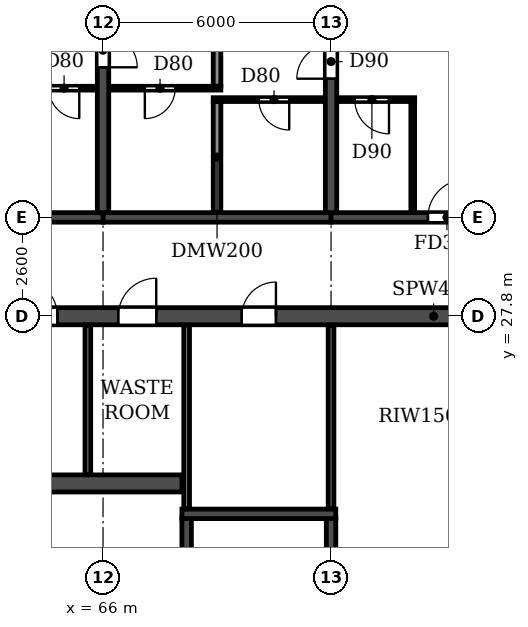
"""IFC4 building model, lengths in metres.
Left out: names, types, materials, properties, quantities, classifications, styles, units other than length and angle.
Written with IfcOpenShell. Run it as: python <this file> out.ifc"""

import sys

from ifc_helpers import new_model, si_unit, direction, frame, frame_2d, origin, place, context, subcontext, project, spatial, rectangle, extrude, element, fill, save


model = new_model("IFC4")
c1 = context("Model", 3, precision=1e-05, world=origin(), true_north=direction((0.0, 1.0)))
c2 = subcontext(c1, "Body", "Model", "MODEL_VIEW")
j1 = project(units=[si_unit("LENGTHUNIT", "METRE"), si_unit("PLANEANGLEUNIT", "RADIAN")], contexts=[c1])
p1 = place(None, origin())
s1 = spatial("IfcSite", under=j1, at=p1, CompositionType="ELEMENT")
p2 = place(p1, origin())
s2 = spatial("IfcBuilding", under=s1, at=p2, CompositionType="ELEMENT")
p3 = place(p2, frame((0.0, 0.0, 152.1)))
s3 = spatial("IfcBuildingStorey", under=s2, at=p3, CompositionType="ELEMENT", Elevation=152.1)
p4 = place(p3, frame((66.0, 30.525, 0.0), z_axis=(0.0, 0.0, 1.0), x_axis=(0.0, 1.0, 0.0)))
e1 = element("IfcWall", 1, at=p4, inside=s3, PredefinedType="SHEAR", context=c2, shape_type="SweptSolid", body=[
    extrude(rectangle(XDim=11.675, YDim=0.3, at=frame_2d((5.837, 0.0))), origin(), (0.0, 0.0, 1.0), 3.07),
])
p5 = place(p4, frame((3.825, 0.0, 0.0)))
e2 = element("IfcOpeningElement", 2, at=p5, cuts=e1, PredefinedType="OPENING", context=c2, shape_type="SweptSolid", body=[
    extrude(rectangle(XDim=0.9, YDim=2.1, at=frame_2d((0.45, 1.05))), frame((0.0, 0.16, 0.0), z_axis=(0.0, -1.0, 0.0), x_axis=(1.0, 0.0, 0.0)), (0.0, 0.0, 1.0), 0.32),
])
p6 = place(p3, frame((72.0, 30.525, 0.0), z_axis=(0.0, 0.0, 1.0), x_axis=(0.0, 1.0, 0.0)))
e3 = element("IfcWall", 3, at=p6, inside=s3, PredefinedType="SHEAR", context=c2, shape_type="SweptSolid", body=[
    extrude(rectangle(XDim=11.675, YDim=0.3, at=frame_2d((5.837, 0.0))), origin(), (0.0, 0.0, 1.0), 3.07),
])
p7 = place(p6, frame((3.525, 0.0, 0.0)))
e4 = element("IfcOpeningElement", 4, at=p7, cuts=e3, PredefinedType="OPENING", context=c2, shape_type="SweptSolid", body=[
    extrude(rectangle(XDim=0.9, YDim=2.1, at=frame_2d((0.45, 1.05))), frame((0.0, 0.16, 0.0), z_axis=(0.0, -1.0, 0.0), x_axis=(1.0, 0.0, 0.0)), (0.0, 0.0, 1.0), 0.32),
])
p8 = place(p3, frame((60.0, 30.4, 0.0), z_axis=(0.0, 0.0, 1.0), x_axis=(1.0, 0.0, 0.0)))
e5 = element("IfcWall", 5, at=p8, inside=s3, PredefinedType="SHEAR", context=c2, shape_type="SweptSolid", body=[
    extrude(rectangle(XDim=6.0, YDim=0.25, at=frame_2d((3.0, 0.0))), origin(), (0.0, 0.0, 1.0), 2.47),
])
p9 = place(p8, frame((2.55, 0.0, 0.0)))
e6 = element("IfcOpeningElement", 6, at=p9, cuts=e5, PredefinedType="OPENING", context=c2, shape_type="SweptSolid", body=[
    extrude(rectangle(XDim=1.0, YDim=2.1, at=frame_2d((0.5, 1.05))), frame((0.0, 0.135, 0.0), z_axis=(0.0, -1.0, 0.0), x_axis=(1.0, 0.0, 0.0)), (0.0, 0.0, 1.0), 0.27),
])
p10 = place(p3, frame((66.0, 30.4, 0.0), z_axis=(0.0, 0.0, 1.0), x_axis=(1.0, 0.0, 0.0)))
e7 = element("IfcWall", 7, at=p10, inside=s3, PredefinedType="SHEAR", context=c2, shape_type="SweptSolid", body=[
    extrude(rectangle(XDim=6.0, YDim=0.25, at=frame_2d((3.0, 0.0))), origin(), (0.0, 0.0, 1.0), 2.47),
])
p11 = place(p3, frame((72.0, 30.4, 0.0), z_axis=(0.0, 0.0, 1.0), x_axis=(1.0, 0.0, 0.0)))
e8 = element("IfcWall", 8, at=p11, inside=s3, PredefinedType="SHEAR", context=c2, shape_type="SweptSolid", body=[
    extrude(rectangle(XDim=6.0, YDim=0.25, at=frame_2d((3.0, 0.0))), origin(), (0.0, 0.0, 1.0), 2.47),
])
p12 = place(p11, frame((2.55, 0.0, 0.0)))
e9 = element("IfcOpeningElement", 9, at=p12, cuts=e8, PredefinedType="OPENING", context=c2, shape_type="SweptSolid", body=[
    extrude(rectangle(XDim=1.0, YDim=2.1, at=frame_2d((0.5, 1.05))), frame((0.0, 0.135, 0.0), z_axis=(0.0, -1.0, 0.0), x_axis=(1.0, 0.0, 0.0)), (0.0, 0.0, 1.0), 0.27),
])
p13 = place(p3, frame((12.2, 27.8, 0.0), z_axis=(0.0, 0.0, 1.0), x_axis=(1.0, 0.0, 0.0)))
e10 = element("IfcWall", 10, at=p13, inside=s3, PredefinedType="SOLIDWALL", context=c2, shape_type="SweptSolid", body=[
    extrude(rectangle(XDim=77.6, YDim=0.45, at=frame_2d((38.8, 0.0))), origin(), (0.0, 0.0, 1.0), 3.07),
])
p14 = place(p13, frame((2.3, 0.0, 0.0)))
e11 = element("IfcOpeningElement", 11, at=p14, cuts=e10, PredefinedType="OPENING", context=c2, shape_type="SweptSolid", body=[
    extrude(rectangle(XDim=1.0, YDim=2.1, at=frame_2d((0.5, 1.05))), frame((0.0, 0.235, 0.0), z_axis=(0.0, -1.0, 0.0), x_axis=(1.0, 0.0, 0.0)), (0.0, 0.0, 1.0), 0.47),
])
p15 = place(p13, frame((6.7, 0.0, 0.0)))
e12 = element("IfcOpeningElement", 12, at=p15, cuts=e10, PredefinedType="OPENING", context=c2, shape_type="SweptSolid", body=[
    extrude(rectangle(XDim=1.0, YDim=2.1, at=frame_2d((0.5, 1.05))), frame((0.0, 0.235, 0.0), z_axis=(0.0, -1.0, 0.0), x_axis=(1.0, 0.0, 0.0)), (0.0, 0.0, 1.0), 0.47),
])
p16 = place(p13, frame((10.05, 0.0, 0.0)))
e13 = element("IfcOpeningElement", 13, at=p16, cuts=e10, PredefinedType="OPENING", context=c2, shape_type="SweptSolid", body=[
    extrude(rectangle(XDim=0.9, YDim=2.1, at=frame_2d((0.45, 1.05))), frame((0.0, 0.235, 0.0), z_axis=(0.0, -1.0, 0.0), x_axis=(1.0, 0.0, 0.0)), (0.0, 0.0, 1.0), 0.47),
])
p17 = place(p13, frame((19.25, 0.0, 0.0)))
e14 = element("IfcOpeningElement", 14, at=p17, cuts=e10, PredefinedType="OPENING", context=c2, shape_type="SweptSolid", body=[
    extrude(rectangle(XDim=0.9, YDim=2.1, at=frame_2d((0.45, 1.05))), frame((0.0, 0.235, 0.0), z_axis=(0.0, -1.0, 0.0), x_axis=(1.0, 0.0, 0.0)), (0.0, 0.0, 1.0), 0.47),
])
p18 = place(p13, frame((22.4, 0.0, 0.0)))
e15 = element("IfcOpeningElement", 15, at=p18, cuts=e10, PredefinedType="OPENING", context=c2, shape_type="SweptSolid", body=[
    extrude(rectangle(XDim=1.0, YDim=2.1, at=frame_2d((0.5, 1.05))), frame((0.0, 0.235, 0.0), z_axis=(0.0, -1.0, 0.0), x_axis=(1.0, 0.0, 0.0)), (0.0, 0.0, 1.0), 0.47),
])
p19 = place(p13, frame((27.6, 0.0, 0.0)))
e16 = element("IfcOpeningElement", 16, at=p19, cuts=e10, PredefinedType="OPENING", context=c2, shape_type="SweptSolid", body=[
    extrude(rectangle(XDim=1.0, YDim=2.1, at=frame_2d((0.5, 1.05))), frame((0.0, 0.235, 0.0), z_axis=(0.0, -1.0, 0.0), x_axis=(1.0, 0.0, 0.0)), (0.0, 0.0, 1.0), 0.47),
])
p20 = place(p13, frame((35.4, 0.0, 0.0)))
e17 = element("IfcOpeningElement", 17, at=p20, cuts=e10, PredefinedType="OPENING", context=c2, shape_type="SweptSolid", body=[
    extrude(rectangle(XDim=1.0, YDim=2.1, at=frame_2d((0.5, 1.05))), frame((0.0, 0.235, 0.0), z_axis=(0.0, -1.0, 0.0), x_axis=(1.0, 0.0, 0.0)), (0.0, 0.0, 1.0), 0.47),
])
p21 = place(p13, frame((38.3, 0.0, 0.0)))
e18 = element("IfcOpeningElement", 18, at=p21, cuts=e10, PredefinedType="OPENING", context=c2, shape_type="SweptSolid", body=[
    extrude(rectangle(XDim=1.0, YDim=2.1, at=frame_2d((0.5, 1.05))), frame((0.0, 0.235, 0.0), z_axis=(0.0, -1.0, 0.0), x_axis=(1.0, 0.0, 0.0)), (0.0, 0.0, 1.0), 0.47),
])
p22 = place(p13, frame((42.25, 0.0, 0.0)))
e19 = element("IfcOpeningElement", 19, at=p22, cuts=e10, PredefinedType="OPENING", context=c2, shape_type="SweptSolid", body=[
    extrude(rectangle(XDim=1.5, YDim=2.1, at=frame_2d((0.75, 1.05))), frame((0.0, 0.235, 0.0), z_axis=(0.0, -1.0, 0.0), x_axis=(1.0, 0.0, 0.0)), (0.0, 0.0, 1.0), 0.47),
])
p23 = place(p13, frame((47.7, 0.0, 0.0)))
e20 = element("IfcOpeningElement", 20, at=p23, cuts=e10, PredefinedType="OPENING", context=c2, shape_type="SweptSolid", body=[
    extrude(rectangle(XDim=1.0, YDim=2.1, at=frame_2d((0.5, 1.05))), frame((0.0, 0.235, 0.0), z_axis=(0.0, -1.0, 0.0), x_axis=(1.0, 0.0, 0.0)), (0.0, 0.0, 1.0), 0.47),
])
p24 = place(p13, frame((51.6, 0.0, 0.0)))
e21 = element("IfcOpeningElement", 21, at=p24, cuts=e10, PredefinedType="OPENING", context=c2, shape_type="SweptSolid", body=[
    extrude(rectangle(XDim=1.0, YDim=2.1, at=frame_2d((0.5, 1.05))), frame((0.0, 0.235, 0.0), z_axis=(0.0, -1.0, 0.0), x_axis=(1.0, 0.0, 0.0)), (0.0, 0.0, 1.0), 0.47),
])
p25 = place(p13, frame((54.2, 0.0, 0.0)))
e22 = element("IfcOpeningElement", 22, at=p25, cuts=e10, PredefinedType="OPENING", context=c2, shape_type="SweptSolid", body=[
    extrude(rectangle(XDim=1.0, YDim=2.1, at=frame_2d((0.5, 1.05))), frame((0.0, 0.235, 0.0), z_axis=(0.0, -1.0, 0.0), x_axis=(1.0, 0.0, 0.0)), (0.0, 0.0, 1.0), 0.47),
])
p26 = place(p13, frame((57.45, 0.0, 0.0)))
e23 = element("IfcOpeningElement", 23, at=p26, cuts=e10, PredefinedType="OPENING", context=c2, shape_type="SweptSolid", body=[
    extrude(rectangle(XDim=0.9, YDim=2.1, at=frame_2d((0.45, 1.05))), frame((0.0, 0.235, 0.0), z_axis=(0.0, -1.0, 0.0), x_axis=(1.0, 0.0, 0.0)), (0.0, 0.0, 1.0), 0.47),
])
p27 = place(p13, frame((66.65, 0.0, 0.0)))
e24 = element("IfcOpeningElement", 24, at=p27, cuts=e10, PredefinedType="OPENING", context=c2, shape_type="SweptSolid", body=[
    extrude(rectangle(XDim=0.9, YDim=2.1, at=frame_2d((0.45, 1.05))), frame((0.0, 0.235, 0.0), z_axis=(0.0, -1.0, 0.0), x_axis=(1.0, 0.0, 0.0)), (0.0, 0.0, 1.0), 0.47),
])
p28 = place(p13, frame((69.9, 0.0, 0.0)))
e25 = element("IfcOpeningElement", 25, at=p28, cuts=e10, PredefinedType="OPENING", context=c2, shape_type="SweptSolid", body=[
    extrude(rectangle(XDim=1.0, YDim=2.1, at=frame_2d((0.5, 1.05))), frame((0.0, 0.235, 0.0), z_axis=(0.0, -1.0, 0.0), x_axis=(1.0, 0.0, 0.0)), (0.0, 0.0, 1.0), 0.47),
])
p29 = place(p13, frame((74.3, 0.0, 0.0)))
e26 = element("IfcOpeningElement", 26, at=p29, cuts=e10, PredefinedType="OPENING", context=c2, shape_type="SweptSolid", body=[
    extrude(rectangle(XDim=1.0, YDim=2.1, at=frame_2d((0.5, 1.05))), frame((0.0, 0.235, 0.0), z_axis=(0.0, -1.0, 0.0), x_axis=(1.0, 0.0, 0.0)), (0.0, 0.0, 1.0), 0.47),
])
p30 = place(p3, frame((33.925, 23.4, 0.0), z_axis=(0.0, 0.0, 1.0), x_axis=(1.0, 0.0, 0.0)))
e27 = element("IfcWall", 27, at=p30, inside=s3, PredefinedType="SOLIDWALL", context=c2, shape_type="SweptSolid", body=[
    extrude(rectangle(XDim=34.15, YDim=0.45, at=frame_2d((17.075, 0.0))), origin(), (0.0, 0.0, 1.0), 3.07),
])
p31 = place(p30, frame((16.175, 0.0, 0.0)))
e28 = element("IfcOpeningElement", 28, at=p31, cuts=e27, PredefinedType="OPENING", context=c2, shape_type="SweptSolid", body=[
    extrude(rectangle(XDim=1.8, YDim=2.1, at=frame_2d((0.9, 1.05))), frame((0.0, 0.235, 0.0), z_axis=(0.0, -1.0, 0.0), x_axis=(1.0, 0.0, 0.0)), (0.0, 0.0, 1.0), 0.47),
])
p32 = place(p30, frame((0.625, 0.0, 0.0)))
e29 = element("IfcOpeningElement", 29, at=p32, cuts=e27, PredefinedType="OPENING", context=c2, shape_type="SweptSolid", body=[
    extrude(rectangle(XDim=1.1, YDim=2.1, at=frame_2d((0.55, 1.05))), frame((0.0, 0.235, 0.0), z_axis=(0.0, -1.0, 0.0), x_axis=(1.0, 0.0, 0.0)), (0.0, 0.0, 1.0), 0.47),
])
p33 = place(p30, frame((3.225, 0.0, 0.0)))
e30 = element("IfcOpeningElement", 30, at=p33, cuts=e27, PredefinedType="OPENING", context=c2, shape_type="SweptSolid", body=[
    extrude(rectangle(XDim=1.1, YDim=2.1, at=frame_2d((0.55, 1.05))), frame((0.0, 0.235, 0.0), z_axis=(0.0, -1.0, 0.0), x_axis=(1.0, 0.0, 0.0)), (0.0, 0.0, 1.0), 0.47),
])
p34 = place(p30, frame((5.825, 0.0, 0.0)))
e31 = element("IfcOpeningElement", 31, at=p34, cuts=e27, PredefinedType="OPENING", context=c2, shape_type="SweptSolid", body=[
    extrude(rectangle(XDim=1.1, YDim=2.1, at=frame_2d((0.55, 1.05))), frame((0.0, 0.235, 0.0), z_axis=(0.0, -1.0, 0.0), x_axis=(1.0, 0.0, 0.0)), (0.0, 0.0, 1.0), 0.47),
])
p35 = place(p30, frame((8.425, 0.0, 0.0)))
e32 = element("IfcOpeningElement", 32, at=p35, cuts=e27, PredefinedType="OPENING", context=c2, shape_type="SweptSolid", body=[
    extrude(rectangle(XDim=1.1, YDim=2.1, at=frame_2d((0.55, 1.05))), frame((0.0, 0.235, 0.0), z_axis=(0.0, -1.0, 0.0), x_axis=(1.0, 0.0, 0.0)), (0.0, 0.0, 1.0), 0.47),
])
p36 = place(p30, frame((11.025, 0.0, 0.0)))
e33 = element("IfcOpeningElement", 33, at=p36, cuts=e27, PredefinedType="OPENING", context=c2, shape_type="SweptSolid", body=[
    extrude(rectangle(XDim=1.1, YDim=2.1, at=frame_2d((0.55, 1.05))), frame((0.0, 0.235, 0.0), z_axis=(0.0, -1.0, 0.0), x_axis=(1.0, 0.0, 0.0)), (0.0, 0.0, 1.0), 0.47),
])
p37 = place(p30, frame((13.625, 0.0, 0.0)))
e34 = element("IfcOpeningElement", 34, at=p37, cuts=e27, PredefinedType="OPENING", context=c2, shape_type="SweptSolid", body=[
    extrude(rectangle(XDim=1.1, YDim=2.1, at=frame_2d((0.55, 1.05))), frame((0.0, 0.235, 0.0), z_axis=(0.0, -1.0, 0.0), x_axis=(1.0, 0.0, 0.0)), (0.0, 0.0, 1.0), 0.47),
])
p38 = place(p30, frame((27.225, 0.0, 0.0)))
e35 = element("IfcOpeningElement", 35, at=p38, cuts=e27, PredefinedType="OPENING", context=c2, shape_type="SweptSolid", body=[
    extrude(rectangle(XDim=1.1, YDim=2.1, at=frame_2d((0.55, 1.05))), frame((0.0, 0.235, 0.0), z_axis=(0.0, -1.0, 0.0), x_axis=(1.0, 0.0, 0.0)), (0.0, 0.0, 1.0), 0.47),
])
p39 = place(p3, frame((68.2, 14.825, 0.0), z_axis=(0.0, 0.0, 1.0), x_axis=(0.0, 1.0, 0.0)))
e36 = element("IfcWall", 36, at=p39, inside=s3, PredefinedType="SOLIDWALL", context=c2, shape_type="SweptSolid", body=[
    extrude(rectangle(XDim=7.65, YDim=0.25, at=frame_2d((3.825, 0.0))), origin(), (0.0, 0.0, 1.0), 3.07),
])
p40 = place(p39, frame((0.475, 0.0, 0.0)))
e37 = element("IfcOpeningElement", 37, at=p40, cuts=e36, PredefinedType="OPENING", context=c2, shape_type="SweptSolid", body=[
    extrude(rectangle(XDim=1.0, YDim=2.1, at=frame_2d((0.5, 1.05))), frame((0.0, 0.135, 0.0), z_axis=(0.0, -1.0, 0.0), x_axis=(1.0, 0.0, 0.0)), (0.0, 0.0, 1.0), 0.27),
])
p41 = place(p3, frame((72.0, 14.825, 0.0), z_axis=(0.0, 0.0, 1.0), x_axis=(0.0, 1.0, 0.0)))
e38 = element("IfcWall", 38, at=p41, inside=s3, PredefinedType="SOLIDWALL", context=c2, shape_type="SweptSolid", body=[
    extrude(rectangle(XDim=7.65, YDim=0.25, at=frame_2d((3.825, 0.0))), origin(), (0.0, 0.0, 1.0), 3.07),
])
p42 = place(p3, frame((68.075, 22.6, 0.0), z_axis=(0.0, 0.0, 1.0), x_axis=(1.0, 0.0, 0.0)))
e39 = element("IfcWall", 39, at=p42, inside=s3, PredefinedType="SOLIDWALL", context=c2, shape_type="SweptSolid", body=[
    extrude(rectangle(XDim=4.05, YDim=0.25, at=frame_2d((2.025, 0.0))), origin(), (0.0, 0.0, 1.0), 3.07),
])
p43 = place(p3, frame((69.0, 30.535, 0.0), z_axis=(0.0, 0.0, 1.0), x_axis=(0.0, 1.0, 0.0)))
e40 = element("IfcWall", 40, at=p43, inside=s3, PredefinedType="PARTITIONING", context=c2, shape_type="SweptSolid", body=[
    extrude(rectangle(XDim=2.915, YDim=0.2, at=frame_2d((1.458, 0.0))), origin(), (0.0, 0.0, 1.0), 3.07),
])
p44 = place(p3, frame((69.0, 33.85, 0.0), z_axis=(0.0, 0.0, 1.0), x_axis=(0.0, 1.0, 0.0)))
e41 = element("IfcWall", 41, at=p44, inside=s3, PredefinedType="PARTITIONING", context=c2, shape_type="SweptSolid", body=[
    extrude(rectangle(XDim=8.49, YDim=0.2, at=frame_2d((4.245, 0.0))), origin(), (0.0, 0.0, 1.0), 3.07),
])
p45 = place(p3, frame((68.9, 33.5, 0.0), z_axis=(0.0, 0.0, 1.0), x_axis=(1.0, 0.0, 0.0)))
e42 = element("IfcWall", 42, at=p45, inside=s3, PredefinedType="PARTITIONING", context=c2, shape_type="SweptSolid", body=[
    extrude(rectangle(XDim=2.94, YDim=0.1, at=frame_2d((1.47, 0.0))), origin(), (0.0, 0.0, 1.0), 3.07),
])
p46 = place(p45, frame((1.2, 0.0, 0.0)))
e43 = element("IfcOpeningElement", 43, at=p46, cuts=e42, PredefinedType="OPENING", context=c2, shape_type="SweptSolid", body=[
    extrude(rectangle(XDim=0.8, YDim=2.1, at=frame_2d((0.4, 1.05))), frame((0.0, 0.06, 0.0), z_axis=(0.0, -1.0, 0.0), x_axis=(1.0, 0.0, 0.0)), (0.0, 0.0, 1.0), 0.12),
])
p47 = place(p3, frame((72.16, 33.5, 0.0), z_axis=(0.0, 0.0, 1.0), x_axis=(1.0, 0.0, 0.0)))
e44 = element("IfcWall", 44, at=p47, inside=s3, PredefinedType="PARTITIONING", context=c2, shape_type="SweptSolid", body=[
    extrude(rectangle(XDim=2.04, YDim=0.1, at=frame_2d((1.02, 0.0))), origin(), (0.0, 0.0, 1.0), 3.07),
])
p48 = place(p47, frame((0.465, 0.0, 0.0)))
e45 = element("IfcOpeningElement", 45, at=p48, cuts=e44, PredefinedType="OPENING", context=c2, shape_type="SweptSolid", body=[
    extrude(rectangle(XDim=0.9, YDim=2.1, at=frame_2d((0.45, 1.05))), frame((0.0, 0.06, 0.0), z_axis=(0.0, -1.0, 0.0), x_axis=(1.0, 0.0, 0.0)), (0.0, 0.0, 1.0), 0.12),
])
p49 = place(p3, frame((63.9, 33.8, 0.0), z_axis=(0.0, 0.0, 1.0), x_axis=(1.0, 0.0, 0.0)))
e46 = element("IfcWall", 46, at=p49, inside=s3, PredefinedType="PARTITIONING", context=c2, shape_type="SweptSolid", body=[
    extrude(rectangle(XDim=1.94, YDim=0.1, at=frame_2d((0.97, 0.0))), origin(), (0.0, 0.0, 1.0), 3.07),
])
p50 = place(p49, frame((0.675, 0.0, 0.0)))
e47 = element("IfcOpeningElement", 47, at=p50, cuts=e46, PredefinedType="OPENING", context=c2, shape_type="SweptSolid", body=[
    extrude(rectangle(XDim=0.8, YDim=2.1, at=frame_2d((0.4, 1.05))), frame((0.0, 0.06, 0.0), z_axis=(0.0, -1.0, 0.0), x_axis=(1.0, 0.0, 0.0)), (0.0, 0.0, 1.0), 0.12),
])
p51 = place(p3, frame((66.16, 33.8, 0.0), z_axis=(0.0, 0.0, 1.0), x_axis=(1.0, 0.0, 0.0)))
e48 = element("IfcWall", 48, at=p51, inside=s3, PredefinedType="PARTITIONING", context=c2, shape_type="SweptSolid", body=[
    extrude(rectangle(XDim=2.94, YDim=0.1, at=frame_2d((1.47, 0.0))), origin(), (0.0, 0.0, 1.0), 3.07),
])
p52 = place(p51, frame((0.94, 0.0, 0.0)))
e49 = element("IfcOpeningElement", 49, at=p52, cuts=e48, PredefinedType="OPENING", context=c2, shape_type="SweptSolid", body=[
    extrude(rectangle(XDim=0.8, YDim=2.1, at=frame_2d((0.4, 1.05))), frame((0.0, 0.06, 0.0), z_axis=(0.0, -1.0, 0.0), x_axis=(1.0, 0.0, 0.0)), (0.0, 0.0, 1.0), 0.12),
])
p53 = place(p3, frame((74.15, 30.535, 0.0), z_axis=(0.0, 0.0, 1.0), x_axis=(0.0, 1.0, 0.0)))
e50 = element("IfcWall", 50, at=p53, inside=s3, PredefinedType="PARTITIONING", context=c2, shape_type="SweptSolid", body=[
    extrude(rectangle(XDim=2.915, YDim=0.1, at=frame_2d((1.458, 0.0))), origin(), (0.0, 0.0, 1.0), 3.07),
])
p54 = place(p3, frame((65.6, 23.635, 0.0), z_axis=(0.0, 0.0, 1.0), x_axis=(0.0, 1.0, 0.0)))
e51 = element("IfcWall", 51, at=p54, inside=s3, PredefinedType="PARTITIONING", context=c2, shape_type="SweptSolid", body=[
    extrude(rectangle(XDim=3.93, YDim=0.15, at=frame_2d((1.965, 0.0))), origin(), (0.0, 0.0, 1.0), 3.07),
])
for number, where, z_axis, x_axis in (
    (52, (68.2, 22.735, 0.0), (0.0, 0.0, 1.0), (0.0, 1.0, 0.0)),
    (53, (72.0, 22.735, 0.0), (0.0, 0.0, 1.0), (0.0, 1.0, 0.0)),
):
    element("IfcWall", number, at=place(p3, frame(where, z_axis=z_axis, x_axis=x_axis)), inside=s3, PredefinedType="PARTITIONING", context=c2, shape_type="SweptSolid", body=[
        extrude(rectangle(XDim=4.83, YDim=0.15, at=frame_2d((2.415, 0.0))), origin(), (0.0, 0.0, 1.0), 3.07),
    ])
p55 = place(p24, origin())
e54 = element("IfcDoor", 54, at=p55, inside=s3, OperationType="SINGLE_SWING_LEFT", PredefinedType="DOOR", context=c2, shape_type="SweptSolid", body=[
    extrude(rectangle(XDim=1.0, YDim=2.1, at=frame_2d((0.5, 1.05))), frame((0.0, 0.025, 0.0), z_axis=(0.0, -1.0, 0.0), x_axis=(1.0, 0.0, 0.0)), (0.0, 0.0, 1.0), 0.05),
])
fill(e21, e54)
p56 = place(p25, origin())
e55 = element("IfcDoor", 55, at=p56, inside=s3, OperationType="SINGLE_SWING_RIGHT", PredefinedType="DOOR", context=c2, shape_type="SweptSolid", body=[
    extrude(rectangle(XDim=1.0, YDim=2.1, at=frame_2d((0.5, 1.05))), frame((0.0, 0.025, 0.0), z_axis=(0.0, -1.0, 0.0), x_axis=(1.0, 0.0, 0.0)), (0.0, 0.0, 1.0), 0.05),
])
fill(e22, e55)
p57 = place(p26, origin())
e56 = element("IfcDoor", 56, at=p57, inside=s3, OperationType="SINGLE_SWING_RIGHT", PredefinedType="DOOR", context=c2, shape_type="SweptSolid", body=[
    extrude(rectangle(XDim=0.9, YDim=2.1, at=frame_2d((0.45, 1.05))), frame((0.0, 0.025, 0.0), z_axis=(0.0, -1.0, 0.0), x_axis=(1.0, 0.0, 0.0)), (0.0, 0.0, 1.0), 0.05),
])
fill(e23, e56)
p58 = place(p52, frame((0.8, 0.0, 0.0), z_axis=(0.0, 0.0, 1.0), x_axis=(-1.0, 0.0, 0.0)))
e57 = element("IfcDoor", 57, at=p58, inside=s3, OperationType="SINGLE_SWING_RIGHT", PredefinedType="DOOR", context=c2, shape_type="SweptSolid", body=[
    extrude(rectangle(XDim=0.8, YDim=2.1, at=frame_2d((0.4, 1.05))), frame((0.0, 0.025, 0.0), z_axis=(0.0, -1.0, 0.0), x_axis=(1.0, 0.0, 0.0)), (0.0, 0.0, 1.0), 0.05),
])
fill(e49, e57)
p59 = place(p50, frame((0.8, 0.0, 0.0), z_axis=(0.0, 0.0, 1.0), x_axis=(-1.0, 0.0, 0.0)))
e58 = element("IfcDoor", 58, at=p59, inside=s3, OperationType="SINGLE_SWING_LEFT", PredefinedType="DOOR", context=c2, shape_type="SweptSolid", body=[
    extrude(rectangle(XDim=0.8, YDim=2.1, at=frame_2d((0.4, 1.05))), frame((0.0, 0.025, 0.0), z_axis=(0.0, -1.0, 0.0), x_axis=(1.0, 0.0, 0.0)), (0.0, 0.0, 1.0), 0.05),
])
fill(e47, e58)
p60 = place(p5, frame((0.9, 0.0, 0.0), z_axis=(0.0, 0.0, 1.0), x_axis=(-1.0, 0.0, 0.0)))
e59 = element("IfcDoor", 59, at=p60, inside=s3, OperationType="SINGLE_SWING_RIGHT", PredefinedType="DOOR", context=c2, shape_type="SweptSolid", body=[
    extrude(rectangle(XDim=0.9, YDim=2.1, at=frame_2d((0.45, 1.05))), frame((0.0, 0.025, 0.0), z_axis=(0.0, -1.0, 0.0), x_axis=(1.0, 0.0, 0.0)), (0.0, 0.0, 1.0), 0.05),
])
fill(e2, e59)
p61 = place(p46, frame((0.8, 0.0, 0.0), z_axis=(0.0, 0.0, 1.0), x_axis=(-1.0, 0.0, 0.0)))
e60 = element("IfcDoor", 60, at=p61, inside=s3, OperationType="SINGLE_SWING_LEFT", PredefinedType="DOOR", context=c2, shape_type="SweptSolid", body=[
    extrude(rectangle(XDim=0.8, YDim=2.1, at=frame_2d((0.4, 1.05))), frame((0.0, 0.025, 0.0), z_axis=(0.0, -1.0, 0.0), x_axis=(1.0, 0.0, 0.0)), (0.0, 0.0, 1.0), 0.05),
])
fill(e43, e60)
p62 = place(p7, origin())
e61 = element("IfcDoor", 61, at=p62, inside=s3, OperationType="SINGLE_SWING_LEFT", PredefinedType="DOOR", context=c2, shape_type="SweptSolid", body=[
    extrude(rectangle(XDim=0.9, YDim=2.1, at=frame_2d((0.45, 1.05))), frame((0.0, 0.025, 0.0), z_axis=(0.0, -1.0, 0.0), x_axis=(1.0, 0.0, 0.0)), (0.0, 0.0, 1.0), 0.05),
])
fill(e4, e61)
p63 = place(p48, frame((0.9, 0.0, 0.0), z_axis=(0.0, 0.0, 1.0), x_axis=(-1.0, 0.0, 0.0)))
e62 = element("IfcDoor", 62, at=p63, inside=s3, OperationType="SINGLE_SWING_LEFT", PredefinedType="DOOR", context=c2, shape_type="SweptSolid", body=[
    extrude(rectangle(XDim=0.9, YDim=2.1, at=frame_2d((0.45, 1.05))), frame((0.0, 0.025, 0.0), z_axis=(0.0, -1.0, 0.0), x_axis=(1.0, 0.0, 0.0)), (0.0, 0.0, 1.0), 0.05),
])
fill(e45, e62)
p64 = place(p12, origin())
e63 = element("IfcDoor", 63, at=p64, inside=s3, OperationType="SINGLE_SWING_RIGHT", PredefinedType="DOOR", context=c2, shape_type="SweptSolid", body=[
    extrude(rectangle(XDim=1.0, YDim=2.1, at=frame_2d((0.5, 1.05))), frame((0.0, 0.025, 0.0), z_axis=(0.0, -1.0, 0.0), x_axis=(1.0, 0.0, 0.0)), (0.0, 0.0, 1.0), 0.05),
])
fill(e9, e63)
save(model, sys.argv[1])
